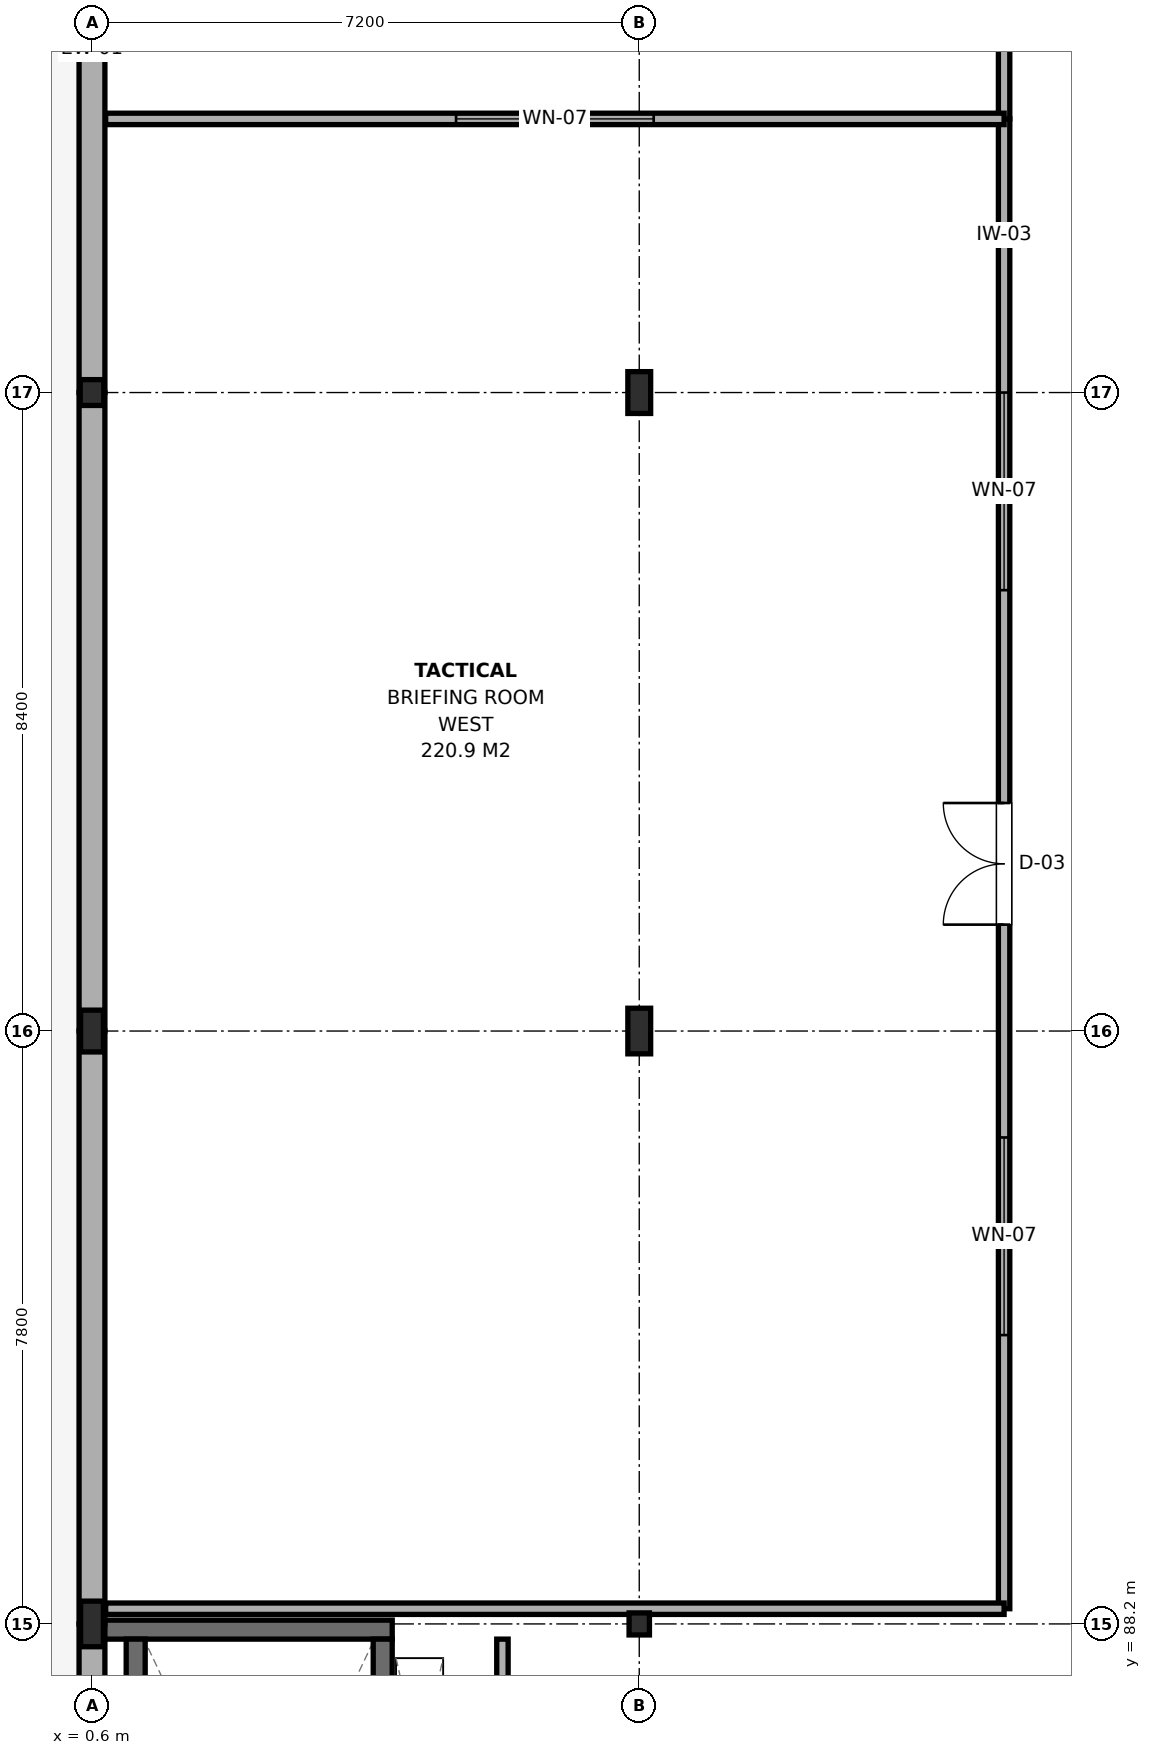
"""IFC4 building model, lengths in metres.
Left out: names, types, materials, properties, quantities, classifications, styles, units other than length and angle.
Written with IfcOpenShell. Run it as: python <this file> out.ifc"""

import sys

from ifc_helpers import new_model, si_unit, direction, frame, frame_2d, origin, origin_2d, place, context, subcontext, project, spatial, rectangle, i_section, extrude, element, fill, save


model = new_model("IFC4")
c1 = context("Model", 3, precision=1e-05, world=origin(), true_north=direction((0.0, 1.0)))
c2 = subcontext(c1, "Body", "Model", "MODEL_VIEW")
j1 = project(units=[si_unit("LENGTHUNIT", "METRE"), si_unit("PLANEANGLEUNIT", "RADIAN")], contexts=[c1])
p1 = place(None, origin())
s1 = spatial("IfcSite", under=j1, at=p1, CompositionType="ELEMENT")
p2 = place(p1, origin())
s2 = spatial("IfcBuilding", under=s1, at=p2, CompositionType="ELEMENT")
p3 = place(p2, frame((0.0, 0.0, 13.2)))
s3 = spatial("IfcBuildingStorey", under=s2, at=p3, CompositionType="ELEMENT", Elevation=13.2)
p4 = place(p3, frame((0.6, 88.2, 0.0), z_axis=(0.0, 0.0, 1.0), x_axis=(1.0, 0.0, 0.0)))
e1 = element("IfcColumn", 1, at=p4, inside=s3, PredefinedType="COLUMN", context=c2, shape_type="SweptSolid", body=[
    extrude(i_section(OverallWidth=0.3, OverallDepth=0.6, WebThickness=0.015, FlangeThickness=0.03, FilletRadius=0.027, at=origin_2d()), origin(), (0.0, 0.0, 1.0), 3.9),
])
p5 = place(p3, frame((0.6, 96.0, 0.0), z_axis=(0.0, 0.0, 1.0), x_axis=(1.0, 0.0, 0.0)))
e2 = element("IfcColumn", 2, at=p5, inside=s3, PredefinedType="COLUMN", context=c2, shape_type="SweptSolid", body=[
    extrude(i_section(OverallWidth=0.3, OverallDepth=0.55, WebThickness=0.015, FlangeThickness=0.029, FilletRadius=0.027, at=origin_2d()), origin(), (0.0, 0.0, 1.0), 3.9),
])
p6 = place(p3, frame((0.6, 104.4, 0.0), z_axis=(0.0, 0.0, 1.0), x_axis=(1.0, 0.0, 0.0)))
e3 = element("IfcColumn", 3, at=p6, inside=s3, PredefinedType="COLUMN", context=c2, shape_type="SweptSolid", body=[
    extrude(i_section(OverallWidth=0.31, OverallDepth=0.34, WebThickness=0.021, FlangeThickness=0.039, FilletRadius=0.027, at=origin_2d()), origin(), (0.0, 0.0, 1.0), 3.9),
])
p7 = place(p3, frame((7.8, 88.2, 0.0), z_axis=(0.0, 0.0, 1.0), x_axis=(1.0, 0.0, 0.0)))
e4 = element("IfcColumn", 4, at=p7, inside=s3, PredefinedType="COLUMN", context=c2, shape_type="SweptSolid", body=[
    extrude(i_section(OverallWidth=0.268, OverallDepth=0.29, WebThickness=0.018, FlangeThickness=0.032, FilletRadius=0.024, at=origin_2d()), origin(), (0.0, 0.0, 1.0), 3.9),
])
p8 = place(p3, frame((7.8, 96.0, 0.0), z_axis=(0.0, 0.0, 1.0), x_axis=(1.0, 0.0, 0.0)))
e5 = element("IfcColumn", 5, at=p8, inside=s3, PredefinedType="COLUMN", context=c2, shape_type="SweptSolid", body=[
    extrude(i_section(OverallWidth=0.3, OverallDepth=0.6, WebThickness=0.015, FlangeThickness=0.03, FilletRadius=0.027, at=origin_2d()), origin(), (0.0, 0.0, 1.0), 3.9),
])
p9 = place(p3, frame((7.8, 104.4, 0.0), z_axis=(0.0, 0.0, 1.0), x_axis=(1.0, 0.0, 0.0)))
e6 = element("IfcColumn", 6, at=p9, inside=s3, PredefinedType="COLUMN", context=c2, shape_type="SweptSolid", body=[
    extrude(i_section(OverallWidth=0.3, OverallDepth=0.55, WebThickness=0.015, FlangeThickness=0.029, FilletRadius=0.027, at=origin_2d()), origin(), (0.0, 0.0, 1.0), 3.9),
])
p10 = place(p3, frame((0.75, 88.125, 0.0), z_axis=(0.0, 0.0, 1.0), x_axis=(1.0, 0.0, 0.0)))
e7 = element("IfcWall", 7, at=p10, inside=s3, PredefinedType="SHEAR", context=c2, shape_type="SweptSolid", body=[
    extrude(rectangle(XDim=3.8, YDim=0.25, at=frame_2d((1.9, 0.0))), origin(), (0.0, 0.0, 1.0), 3.7),
])
p11 = place(p3, frame((1.175, 81.6, 0.0), z_axis=(0.0, 0.0, 1.0), x_axis=(0.0, 1.0, 0.0)))
e8 = element("IfcWall", 8, at=p11, inside=s3, PredefinedType="SHEAR", context=c2, shape_type="SweptSolid", body=[
    extrude(rectangle(XDim=6.4, YDim=0.25, at=frame_2d((3.2, 0.0))), origin(), (0.0, 0.0, 1.0), 3.7),
])
p12 = place(p3, frame((4.425, 81.6, 0.0), z_axis=(0.0, 0.0, 1.0), x_axis=(0.0, 1.0, 0.0)))
e9 = element("IfcWall", 9, at=p12, inside=s3, PredefinedType="SHEAR", context=c2, shape_type="SweptSolid", body=[
    extrude(rectangle(XDim=6.4, YDim=0.25, at=frame_2d((3.2, 0.0))), origin(), (0.0, 0.0, 1.0), 3.7),
])
p13 = place(p12, frame((0.17, 0.0, 0.0)))
e10 = element("IfcOpeningElement", 10, at=p13, cuts=e9, PredefinedType="OPENING", context=c2, shape_type="SweptSolid", body=[
    extrude(rectangle(XDim=1.1, YDim=2.15, at=frame_2d((0.55, 1.075))), frame((0.0, 0.14, 0.0), z_axis=(0.0, -1.0, 0.0), x_axis=(1.0, 0.0, 0.0)), (0.0, 0.0, 1.0), 0.28),
])
p14 = place(p3, frame((0.6, 81.0, 0.0), z_axis=(0.0, 0.0, 1.0), x_axis=(0.0, 1.0, 0.0)))
e11 = element("IfcWall", 11, at=p14, inside=s3, PredefinedType="SOLIDWALL", context=c2, shape_type="SweptSolid", body=[
    extrude(rectangle(XDim=7.2, YDim=0.34, at=frame_2d((3.6, 0.0))), origin(), (0.0, 0.0, 1.0), 3.345),
])
p15 = place(p3, frame((0.6, 88.2, 0.0), z_axis=(0.0, 0.0, 1.0), x_axis=(0.0, 1.0, 0.0)))
e12 = element("IfcWall", 12, at=p15, inside=s3, PredefinedType="SOLIDWALL", context=c2, shape_type="SweptSolid", body=[
    extrude(rectangle(XDim=7.8, YDim=0.34, at=frame_2d((3.9, 0.0))), origin(), (0.0, 0.0, 1.0), 3.095),
])
p16 = place(p3, frame((0.6, 96.0, 0.0), z_axis=(0.0, 0.0, 1.0), x_axis=(0.0, 1.0, 0.0)))
e13 = element("IfcWall", 13, at=p16, inside=s3, PredefinedType="SOLIDWALL", context=c2, shape_type="SweptSolid", body=[
    extrude(rectangle(XDim=8.4, YDim=0.34, at=frame_2d((4.2, 0.0))), origin(), (0.0, 0.0, 1.0), 3.095),
])
p17 = place(p3, frame((0.6, 104.4, 0.0), z_axis=(0.0, 0.0, 1.0), x_axis=(0.0, 1.0, 0.0)))
e14 = element("IfcWall", 14, at=p17, inside=s3, PredefinedType="SOLIDWALL", context=c2, shape_type="SweptSolid", body=[
    extrude(rectangle(XDim=9.0, YDim=0.34, at=frame_2d((4.5, 0.0))), origin(), (0.0, 0.0, 1.0), 3.255),
])
p18 = place(p3, frame((6.0, 84.8, 0.0), z_axis=(0.0, 0.0, 1.0), x_axis=(0.0, 1.0, 0.0)))
e15 = element("IfcWall", 15, at=p18, inside=s3, PredefinedType="PARTITIONING", context=c2, shape_type="SweptSolid", body=[
    extrude(rectangle(XDim=3.2, YDim=0.15, at=frame_2d((1.6, 0.0))), origin(), (0.0, 0.0, 1.0), 3.245),
])
p19 = place(p18, frame((1.175, 0.0, 0.0)))
e16 = element("IfcOpeningElement", 16, at=p19, cuts=e15, PredefinedType="OPENING", context=c2, shape_type="SweptSolid", body=[
    extrude(rectangle(XDim=0.85, YDim=2.1, at=frame_2d((0.425, 1.05))), frame((0.0, 0.09, 0.0), z_axis=(0.0, -1.0, 0.0), x_axis=(1.0, 0.0, 0.0)), (0.0, 0.0, 1.0), 0.18),
])
p20 = place(p3, frame((12.6, 88.4, 0.0), z_axis=(0.0, 0.0, 1.0), x_axis=(0.0, 1.0, 0.0)))
e17 = element("IfcWall", 17, at=p20, inside=s3, PredefinedType="PARTITIONING", context=c2, shape_type="SweptSolid", body=[
    extrude(rectangle(XDim=19.6, YDim=0.15, at=frame_2d((9.8, 0.0))), origin(), (0.0, 0.0, 1.0), 3.145),
])
p21 = place(p20, frame((9.0, 0.0, 0.0)))
e18 = element("IfcOpeningElement", 18, at=p21, cuts=e17, PredefinedType="OPENING", context=c2, shape_type="SweptSolid", body=[
    extrude(rectangle(XDim=1.6, YDim=2.15, at=frame_2d((0.8, 1.075))), frame((0.0, 0.09, 0.0), z_axis=(0.0, -1.0, 0.0), x_axis=(1.0, 0.0, 0.0)), (0.0, 0.0, 1.0), 0.18),
])
p22 = place(p20, frame((3.6, 0.0, 0.95)))
e19 = element("IfcOpeningElement", 19, at=p22, cuts=e17, PredefinedType="OPENING", context=c2, shape_type="SweptSolid", body=[
    extrude(rectangle(XDim=2.6, YDim=1.5, at=frame_2d((1.3, 0.75))), frame((0.0, 0.09, 0.0), z_axis=(0.0, -1.0, 0.0), x_axis=(1.0, 0.0, 0.0)), (0.0, 0.0, 1.0), 0.18),
])
p23 = place(p20, frame((13.4, 0.0, 0.95)))
e20 = element("IfcOpeningElement", 20, at=p23, cuts=e17, PredefinedType="OPENING", context=c2, shape_type="SweptSolid", body=[
    extrude(rectangle(XDim=2.6, YDim=1.5, at=frame_2d((1.3, 0.75))), frame((0.0, 0.09, 0.0), z_axis=(0.0, -1.0, 0.0), x_axis=(1.0, 0.0, 0.0)), (0.0, 0.0, 1.0), 0.18),
])
p24 = place(p3, frame((0.78, 88.4, 0.0), z_axis=(0.0, 0.0, 1.0), x_axis=(1.0, 0.0, 0.0)))
e21 = element("IfcWall", 21, at=p24, inside=s3, PredefinedType="PARTITIONING", context=c2, shape_type="SweptSolid", body=[
    extrude(rectangle(XDim=11.82, YDim=0.15, at=frame_2d((5.91, 0.0))), origin(), (0.0, 0.0, 1.0), 3.095),
])
p25 = place(p3, frame((12.6, 108.0, 0.0), z_axis=(0.0, 0.0, 1.0), x_axis=(0.0, 1.0, 0.0)))
e22 = element("IfcWall", 22, at=p25, inside=s3, PredefinedType="PARTITIONING", context=c2, shape_type="SweptSolid", body=[
    extrude(rectangle(XDim=12.0, YDim=0.15, at=frame_2d((6.0, 0.0))), origin(), (0.0, 0.0, 1.0), 3.145),
])
p26 = place(p25, frame((5.475, 0.0, 0.0)))
e23 = element("IfcOpeningElement", 23, at=p26, cuts=e22, PredefinedType="OPENING", context=c2, shape_type="SweptSolid", body=[
    extrude(rectangle(XDim=1.05, YDim=2.15, at=frame_2d((0.525, 1.075))), frame((0.0, 0.09, 0.0), z_axis=(0.0, -1.0, 0.0), x_axis=(1.0, 0.0, 0.0)), (0.0, 0.0, 1.0), 0.18),
])
p27 = place(p25, frame((7.34, 0.0, 0.95)))
e24 = element("IfcOpeningElement", 24, at=p27, cuts=e22, PredefinedType="OPENING", context=c2, shape_type="SweptSolid", body=[
    extrude(rectangle(XDim=2.6, YDim=1.5, at=frame_2d((1.3, 0.75))), frame((0.0, 0.09, 0.0), z_axis=(0.0, -1.0, 0.0), x_axis=(1.0, 0.0, 0.0)), (0.0, 0.0, 1.0), 0.18),
])
p28 = place(p3, frame((0.78, 108.0, 0.0), z_axis=(0.0, 0.0, 1.0), x_axis=(1.0, 0.0, 0.0)))
e25 = element("IfcWall", 25, at=p28, inside=s3, PredefinedType="PARTITIONING", context=c2, shape_type="SweptSolid", body=[
    extrude(rectangle(XDim=11.82, YDim=0.15, at=frame_2d((5.91, 0.0))), origin(), (0.0, 0.0, 1.0), 3.205),
])
p29 = place(p28, frame((4.61, 0.0, 0.95)))
e26 = element("IfcOpeningElement", 26, at=p29, cuts=e25, PredefinedType="OPENING", context=c2, shape_type="SweptSolid", body=[
    extrude(rectangle(XDim=2.6, YDim=1.5, at=frame_2d((1.3, 0.75))), frame((0.0, 0.09, 0.0), z_axis=(0.0, -1.0, 0.0), x_axis=(1.0, 0.0, 0.0)), (0.0, 0.0, 1.0), 0.18),
])
p30 = place(p21, origin())
e27 = element("IfcDoor", 27, at=p30, inside=s3, OperationType="DOUBLE_DOOR_SINGLE_SWING", PredefinedType="DOOR", context=c2, shape_type="SweptSolid", body=[
    extrude(rectangle(XDim=1.6, YDim=2.15, at=frame_2d((0.8, 1.075))), frame((0.0, 0.025, 0.0), z_axis=(0.0, -1.0, 0.0), x_axis=(1.0, 0.0, 0.0)), (0.0, 0.0, 1.0), 0.05),
])
fill(e18, e27)
p31 = place(p22, origin())
e28 = element("IfcWindow", 28, at=p31, inside=s3, PartitioningType="SINGLE_PANEL", PredefinedType="WINDOW", context=c2, shape_type="SweptSolid", body=[
    extrude(rectangle(XDim=2.6, YDim=1.5, at=frame_2d((1.3, 0.75))), frame((0.0, 0.03, 0.0), z_axis=(0.0, -1.0, 0.0), x_axis=(1.0, 0.0, 0.0)), (0.0, 0.0, 1.0), 0.06),
])
fill(e19, e28)
p32 = place(p23, origin())
e29 = element("IfcWindow", 29, at=p32, inside=s3, PartitioningType="SINGLE_PANEL", PredefinedType="WINDOW", context=c2, shape_type="SweptSolid", body=[
    extrude(rectangle(XDim=2.6, YDim=1.5, at=frame_2d((1.3, 0.75))), frame((0.0, 0.03, 0.0), z_axis=(0.0, -1.0, 0.0), x_axis=(1.0, 0.0, 0.0)), (0.0, 0.0, 1.0), 0.06),
])
fill(e20, e29)
p33 = place(p29, origin())
e30 = element("IfcWindow", 30, at=p33, inside=s3, PartitioningType="SINGLE_PANEL", PredefinedType="WINDOW", context=c2, shape_type="SweptSolid", body=[
    extrude(rectangle(XDim=2.6, YDim=1.5, at=frame_2d((1.3, 0.75))), frame((0.0, 0.03, 0.0), z_axis=(0.0, -1.0, 0.0), x_axis=(1.0, 0.0, 0.0)), (0.0, 0.0, 1.0), 0.06),
])
fill(e26, e30)
save(model, sys.argv[1])
